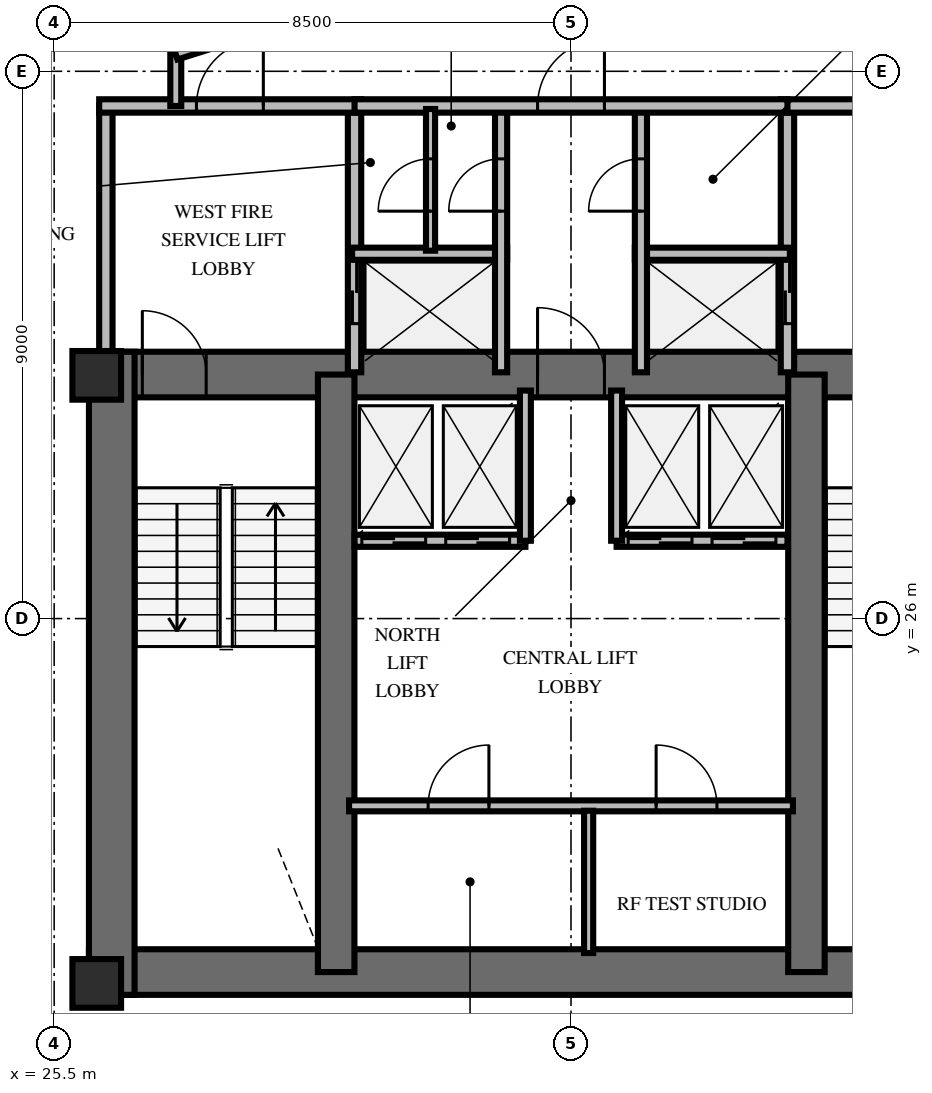
"""IFC4 building model, lengths in metres.
Left out: names, types, materials, properties, quantities, classifications, styles, units other than length and angle.
Written with IfcOpenShell. Run it as: python <this file> out.ifc"""

import sys

from ifc_helpers import new_model, si_unit, direction, frame, frame_2d, origin, origin_2d, place, context, subcontext, project, spatial, rectangle, extrude, element, fill, save


model = new_model("IFC4")
c1 = context("Model", 3, precision=1e-05, world=origin(), true_north=direction((0.0, 1.0)))
c2 = subcontext(c1, "Body", "Model", "MODEL_VIEW")
j1 = project(units=[si_unit("LENGTHUNIT", "METRE"), si_unit("PLANEANGLEUNIT", "RADIAN")], contexts=[c1])
p1 = place(None, origin())
s1 = spatial("IfcSite", under=j1, at=p1, CompositionType="ELEMENT")
p2 = place(p1, origin())
s2 = spatial("IfcBuilding", under=s1, at=p2, CompositionType="ELEMENT")
p3 = place(p2, frame((0.0, 0.0, 173.6)))
s3 = spatial("IfcBuildingStorey", under=s2, at=p3, CompositionType="ELEMENT", Elevation=173.6)
p4 = place(p3, frame((26.072, 20.187, 0.0), z_axis=(0.0, 0.0, 1.0), x_axis=(1.0, 0.0, 0.0)))
e1 = element("IfcWall", 1, at=p4, inside=s3, PredefinedType="SHEAR", context=c2, shape_type="SweptSolid", body=[
    extrude(rectangle(XDim=15.866, YDim=0.75, at=frame_2d((7.933, 0.0))), origin(), (0.0, 0.0, 1.0), 3.6),
])
p5 = place(p3, frame((26.072, 30.013, 0.0), z_axis=(0.0, 0.0, 1.0), x_axis=(1.0, 0.0, 0.0)))
e2 = element("IfcWall", 2, at=p5, inside=s3, PredefinedType="SHEAR", context=c2, shape_type="SweptSolid", body=[
    extrude(rectangle(XDim=15.866, YDim=0.75, at=frame_2d((7.933, 0.0))), origin(), (0.0, 0.0, 1.0), 3.6),
])
p6 = place(p5, frame((0.878, 0.0, 0.0)))
e3 = element("IfcOpeningElement", 3, at=p6, cuts=e2, PredefinedType="OPENING", context=c2, shape_type="SweptSolid", body=[
    extrude(rectangle(XDim=1.05, YDim=2.15, at=frame_2d((0.525, 1.075))), frame((0.0, 0.385, 0.0), z_axis=(0.0, -1.0, 0.0), x_axis=(1.0, 0.0, 0.0)), (0.0, 0.0, 1.0), 0.77),
])
p7 = place(p5, frame((13.928, 0.0, 0.0)))
e4 = element("IfcOpeningElement", 4, at=p7, cuts=e2, PredefinedType="OPENING", context=c2, shape_type="SweptSolid", body=[
    extrude(rectangle(XDim=1.05, YDim=2.15, at=frame_2d((0.525, 1.075))), frame((0.0, 0.385, 0.0), z_axis=(0.0, -1.0, 0.0), x_axis=(1.0, 0.0, 0.0)), (0.0, 0.0, 1.0), 0.77),
])
p8 = place(p5, frame((7.378, 0.0, 0.0)))
e5 = element("IfcOpeningElement", 5, at=p8, cuts=e2, PredefinedType="OPENING", context=c2, shape_type="SweptSolid", body=[
    extrude(rectangle(XDim=1.1, YDim=2.15, at=frame_2d((0.55, 1.075))), frame((0.0, 0.385, 0.0), z_axis=(0.0, -1.0, 0.0), x_axis=(1.0, 0.0, 0.0)), (0.0, 0.0, 1.0), 0.77),
])
p9 = place(p3, frame((26.447, 19.812, 0.0), z_axis=(0.0, 0.0, 1.0), x_axis=(0.0, 1.0, 0.0)))
e6 = element("IfcWall", 6, at=p9, inside=s3, PredefinedType="SHEAR", context=c2, shape_type="SweptSolid", body=[
    extrude(rectangle(XDim=10.576, YDim=0.75, at=frame_2d((5.288, 0.0))), origin(), (0.0, 0.0, 1.0), 3.6),
])
for number, where, z_axis, x_axis in (
    (7, (30.138, 20.187, 0.0), (0.0, 0.0, 1.0), (0.0, 1.0, 0.0)),
    (8, (37.872, 20.187, 0.0), (0.0, 0.0, 1.0), (0.0, 1.0, 0.0)),
):
    element("IfcWall", number, at=place(p3, frame(where, z_axis=z_axis, x_axis=x_axis)), inside=s3, PredefinedType="SHEAR", context=c2, shape_type="SweptSolid", body=[
        extrude(rectangle(XDim=9.826, YDim=0.6, at=frame_2d((4.913, 0.0))), origin(), (0.0, 0.0, 1.0), 3.6),
    ])
for number, where, z_axis, x_axis in (
    (9, (26.2, 20.0, 0.0), (0.0, 0.0, 1.0), (1.0, 0.0, 0.0)),
    (10, (26.2, 30.0, 0.0), (0.0, 0.0, 1.0), (1.0, 0.0, 0.0)),
):
    element("IfcColumn", number, at=place(p3, frame(where, z_axis=z_axis, x_axis=x_axis)), inside=s3, PredefinedType="PILASTER", context=c2, shape_type="SweptSolid", body=[
        extrude(rectangle(XDim=0.8, YDim=0.8, at=origin_2d()), origin(), (0.0, 0.0, 1.0), 3.6),
    ])
p10 = place(p3, frame((26.35, 30.05, 0.0), z_axis=(0.0, 0.0, 1.0), x_axis=(0.0, 1.0, 0.0)))
e11 = element("IfcWall", 11, at=p10, inside=s3, PredefinedType="SOLIDWALL", context=c2, shape_type="SweptSolid", body=[
    extrude(rectangle(XDim=4.38, YDim=0.22, at=frame_2d((2.19, 0.0))), origin(), (0.0, 0.0, 1.0), 2.46),
])
p11 = place(p3, frame((30.44, 30.05, 0.0), z_axis=(0.0, 0.0, 1.0), x_axis=(0.0, 1.0, 0.0)))
e12 = element("IfcWall", 12, at=p11, inside=s3, PredefinedType="SOLIDWALL", context=c2, shape_type="SweptSolid", body=[
    extrude(rectangle(XDim=4.38, YDim=0.22, at=frame_2d((2.19, 0.0))), origin(), (0.0, 0.0, 1.0), 2.46),
])
p12 = place(p11, frame((0.8, 0.0, 0.0)))
e13 = element("IfcOpeningElement", 13, at=p12, cuts=e12, PredefinedType="OPENING", context=c2, shape_type="SweptSolid", body=[
    extrude(rectangle(XDim=1.05, YDim=2.1, at=frame_2d((0.525, 1.05))), frame((0.0, 0.12, 0.0), z_axis=(0.0, -1.0, 0.0), x_axis=(1.0, 0.0, 0.0)), (0.0, 0.0, 1.0), 0.24),
])
p13 = place(p3, frame((26.24, 34.43, 0.0), z_axis=(0.0, 0.0, 1.0), x_axis=(1.0, 0.0, 0.0)))
e14 = element("IfcWall", 14, at=p13, inside=s3, PredefinedType="SOLIDWALL", context=c2, shape_type="SweptSolid", body=[
    extrude(rectangle(XDim=4.31, YDim=0.22, at=frame_2d((2.155, 0.0))), origin(), (0.0, 0.0, 1.0), 2.46),
])
p14 = place(p13, frame((1.6, 0.0, 0.0)))
e15 = element("IfcOpeningElement", 15, at=p14, cuts=e14, PredefinedType="OPENING", context=c2, shape_type="SweptSolid", body=[
    extrude(rectangle(XDim=1.1, YDim=2.15, at=frame_2d((0.55, 1.075))), frame((0.0, 0.12, 0.0), z_axis=(0.0, -1.0, 0.0), x_axis=(1.0, 0.0, 0.0)), (0.0, 0.0, 1.0), 0.24),
])
p15 = place(p3, frame((30.4, 32.0, 0.0), z_axis=(0.0, 0.0, 1.0), x_axis=(1.0, 0.0, 0.0)))
e16 = element("IfcWall", 16, at=p15, inside=s3, PredefinedType="SOLIDWALL", context=c2, shape_type="SweptSolid", body=[
    extrude(rectangle(XDim=2.55, YDim=0.2, at=frame_2d((1.275, 0.0))), origin(), (0.0, 0.0, 1.0), 2.46),
])
p16 = place(p3, frame((32.85, 30.05, 0.0), z_axis=(0.0, 0.0, 1.0), x_axis=(0.0, 1.0, 0.0)))
e17 = element("IfcWall", 17, at=p16, inside=s3, PredefinedType="SOLIDWALL", context=c2, shape_type="SweptSolid", body=[
    extrude(rectangle(XDim=4.38, YDim=0.2, at=frame_2d((2.19, 0.0))), origin(), (0.0, 0.0, 1.0), 2.46),
])
p17 = place(p16, frame((2.65, 0.0, 0.0)))
e18 = element("IfcOpeningElement", 18, at=p17, cuts=e17, PredefinedType="OPENING", context=c2, shape_type="SweptSolid", body=[
    extrude(rectangle(XDim=0.86, YDim=2.05, at=frame_2d((0.43, 1.025))), frame((0.0, 0.11, 0.0), z_axis=(0.0, -1.0, 0.0), x_axis=(1.0, 0.0, 0.0)), (0.0, 0.0, 1.0), 0.22),
])
p18 = place(p3, frame((37.56, 30.05, 0.0), z_axis=(0.0, 0.0, 1.0), x_axis=(0.0, 1.0, 0.0)))
e19 = element("IfcWall", 19, at=p18, inside=s3, PredefinedType="SOLIDWALL", context=c2, shape_type="SweptSolid", body=[
    extrude(rectangle(XDim=4.38, YDim=0.22, at=frame_2d((2.19, 0.0))), origin(), (0.0, 0.0, 1.0), 2.46),
])
p19 = place(p18, frame((0.8, 0.0, 0.0)))
e20 = element("IfcOpeningElement", 20, at=p19, cuts=e19, PredefinedType="OPENING", context=c2, shape_type="SweptSolid", body=[
    extrude(rectangle(XDim=1.05, YDim=2.1, at=frame_2d((0.525, 1.05))), frame((0.0, 0.12, 0.0), z_axis=(0.0, -1.0, 0.0), x_axis=(1.0, 0.0, 0.0)), (0.0, 0.0, 1.0), 0.24),
])
p20 = place(p3, frame((37.45, 34.43, 0.0), z_axis=(0.0, 0.0, 1.0), x_axis=(1.0, 0.0, 0.0)))
e21 = element("IfcWall", 21, at=p20, inside=s3, PredefinedType="SOLIDWALL", context=c2, shape_type="SweptSolid", body=[
    extrude(rectangle(XDim=4.31, YDim=0.22, at=frame_2d((2.155, 0.0))), origin(), (0.0, 0.0, 1.0), 2.46),
])
p21 = place(p20, frame((1.6, 0.0, 0.0)))
e22 = element("IfcOpeningElement", 22, at=p21, cuts=e21, PredefinedType="OPENING", context=c2, shape_type="SweptSolid", body=[
    extrude(rectangle(XDim=1.1, YDim=2.15, at=frame_2d((0.55, 1.075))), frame((0.0, 0.12, 0.0), z_axis=(0.0, -1.0, 0.0), x_axis=(1.0, 0.0, 0.0)), (0.0, 0.0, 1.0), 0.24),
])
p22 = place(p3, frame((35.05, 32.0, 0.0), z_axis=(0.0, 0.0, 1.0), x_axis=(1.0, 0.0, 0.0)))
e23 = element("IfcWall", 23, at=p22, inside=s3, PredefinedType="SOLIDWALL", context=c2, shape_type="SweptSolid", body=[
    extrude(rectangle(XDim=2.55, YDim=0.2, at=frame_2d((1.275, 0.0))), origin(), (0.0, 0.0, 1.0), 2.46),
])
p23 = place(p3, frame((35.15, 30.05, 0.0), z_axis=(0.0, 0.0, 1.0), x_axis=(0.0, 1.0, 0.0)))
e24 = element("IfcWall", 24, at=p23, inside=s3, PredefinedType="SOLIDWALL", context=c2, shape_type="SweptSolid", body=[
    extrude(rectangle(XDim=4.38, YDim=0.2, at=frame_2d((2.19, 0.0))), origin(), (0.0, 0.0, 1.0), 2.46),
])
p24 = place(p23, frame((2.65, 0.0, 0.0)))
e25 = element("IfcOpeningElement", 25, at=p24, cuts=e24, PredefinedType="OPENING", context=c2, shape_type="SweptSolid", body=[
    extrude(rectangle(XDim=0.86, YDim=2.05, at=frame_2d((0.43, 1.025))), frame((0.0, 0.11, 0.0), z_axis=(0.0, -1.0, 0.0), x_axis=(1.0, 0.0, 0.0)), (0.0, 0.0, 1.0), 0.22),
])
p25 = place(p3, frame((30.44, 34.43, 0.0), z_axis=(0.0, 0.0, 1.0), x_axis=(1.0, 0.0, 0.0)))
e26 = element("IfcWall", 26, at=p25, inside=s3, PredefinedType="SOLIDWALL", context=c2, shape_type="SweptSolid", body=[
    extrude(rectangle(XDim=7.12, YDim=0.22, at=frame_2d((3.56, 0.0))), origin(), (0.0, 0.0, 1.0), 2.46),
])
p26 = place(p25, frame((3.01, 0.0, 0.0)))
e27 = element("IfcOpeningElement", 27, at=p26, cuts=e26, PredefinedType="OPENING", context=c2, shape_type="SweptSolid", body=[
    extrude(rectangle(XDim=1.1, YDim=2.15, at=frame_2d((0.55, 1.075))), frame((0.0, 0.12, 0.0), z_axis=(0.0, -1.0, 0.0), x_axis=(1.0, 0.0, 0.0)), (0.0, 0.0, 1.0), 0.24),
])
p27 = place(p3, frame((31.69, 32.05, 0.0), z_axis=(0.0, 0.0, 1.0), x_axis=(0.0, 1.0, 0.0)))
e28 = element("IfcWall", 28, at=p27, inside=s3, PredefinedType="PARTITIONING", context=c2, shape_type="SweptSolid", body=[
    extrude(rectangle(XDim=2.33, YDim=0.15, at=frame_2d((1.165, 0.0))), origin(), (0.0, 0.0, 1.0), 2.46),
])
p28 = place(p27, frame((0.65, 0.0, 0.0)))
e29 = element("IfcOpeningElement", 29, at=p28, cuts=e28, PredefinedType="OPENING", context=c2, shape_type="SweptSolid", body=[
    extrude(rectangle(XDim=0.86, YDim=2.05, at=frame_2d((0.43, 1.025))), frame((0.0, 0.085, 0.0), z_axis=(0.0, -1.0, 0.0), x_axis=(1.0, 0.0, 0.0)), (0.0, 0.0, 1.0), 0.17),
])
p29 = place(p3, frame((30.35, 22.92, 0.0), z_axis=(0.0, 0.0, 1.0), x_axis=(1.0, 0.0, 0.0)))
e30 = element("IfcWall", 30, at=p29, inside=s3, PredefinedType="PARTITIONING", context=c2, shape_type="SweptSolid", body=[
    extrude(rectangle(XDim=7.3, YDim=0.18, at=frame_2d((3.65, 0.0))), origin(), (0.0, 0.0, 1.0), 2.46),
])
p30 = place(p29, frame((1.3, 0.0, 0.0)))
e31 = element("IfcOpeningElement", 31, at=p30, cuts=e30, PredefinedType="OPENING", context=c2, shape_type="SweptSolid", body=[
    extrude(rectangle(XDim=1.0, YDim=2.15, at=frame_2d((0.5, 1.075))), frame((0.0, 0.1, 0.0), z_axis=(0.0, -1.0, 0.0), x_axis=(1.0, 0.0, 0.0)), (0.0, 0.0, 1.0), 0.2),
])
p31 = place(p29, frame((5.05, 0.0, 0.0)))
e32 = element("IfcOpeningElement", 32, at=p31, cuts=e30, PredefinedType="OPENING", context=c2, shape_type="SweptSolid", body=[
    extrude(rectangle(XDim=1.0, YDim=2.15, at=frame_2d((0.5, 1.075))), frame((0.0, 0.1, 0.0), z_axis=(0.0, -1.0, 0.0), x_axis=(1.0, 0.0, 0.0)), (0.0, 0.0, 1.0), 0.2),
])
p32 = place(p3, frame((34.29, 20.5, 0.0), z_axis=(0.0, 0.0, 1.0), x_axis=(0.0, 1.0, 0.0)))
e33 = element("IfcWall", 33, at=p32, inside=s3, PredefinedType="PARTITIONING", context=c2, shape_type="SweptSolid", body=[
    extrude(rectangle(XDim=2.34, YDim=0.15, at=frame_2d((1.17, 0.0))), origin(), (0.0, 0.0, 1.0), 2.46),
])
p33 = place(p3, frame((30.44, 27.28, 0.0), z_axis=(0.0, 0.0, 1.0), x_axis=(1.0, 0.0, 0.0)))
e34 = element("IfcWall", 34, at=p33, inside=s3, PredefinedType="SOLIDWALL", context=c2, shape_type="SweptSolid", body=[
    extrude(rectangle(XDim=2.81, YDim=0.2, at=frame_2d((1.405, 0.0))), origin(), (0.0, 0.0, 1.0), 2.46),
])
p34 = place(p33, frame((0.12, 0.0, 0.0)))
e35 = element("IfcOpeningElement", 35, at=p34, cuts=e34, PredefinedType="OPENING", context=c2, shape_type="SweptSolid", body=[
    extrude(rectangle(XDim=1.05, YDim=2.1, at=frame_2d((0.525, 1.05))), frame((0.0, 0.11, 0.0), z_axis=(0.0, -1.0, 0.0), x_axis=(1.0, 0.0, 0.0)), (0.0, 0.0, 1.0), 0.22),
])
p35 = place(p33, frame((1.5, 0.0, 0.0)))
e36 = element("IfcOpeningElement", 36, at=p35, cuts=e34, PredefinedType="OPENING", context=c2, shape_type="SweptSolid", body=[
    extrude(rectangle(XDim=1.05, YDim=2.1, at=frame_2d((0.525, 1.05))), frame((0.0, 0.11, 0.0), z_axis=(0.0, -1.0, 0.0), x_axis=(1.0, 0.0, 0.0)), (0.0, 0.0, 1.0), 0.22),
])
p36 = place(p3, frame((33.25, 27.28, 0.0), z_axis=(0.0, 0.0, 1.0), x_axis=(0.0, 1.0, 0.0)))
e37 = element("IfcWall", 37, at=p36, inside=s3, PredefinedType="SOLIDWALL", context=c2, shape_type="SweptSolid", body=[
    extrude(rectangle(XDim=2.47, YDim=0.18, at=frame_2d((1.235, 0.0))), origin(), (0.0, 0.0, 1.0), 2.46),
])
p37 = place(p3, frame((34.75, 27.28, 0.0), z_axis=(0.0, 0.0, 1.0), x_axis=(1.0, 0.0, 0.0)))
e38 = element("IfcWall", 38, at=p37, inside=s3, PredefinedType="SOLIDWALL", context=c2, shape_type="SweptSolid", body=[
    extrude(rectangle(XDim=2.81, YDim=0.2, at=frame_2d((1.405, 0.0))), origin(), (0.0, 0.0, 1.0), 2.46),
])
p38 = place(p37, frame((0.19, 0.0, 0.0)))
e39 = element("IfcOpeningElement", 39, at=p38, cuts=e38, PredefinedType="OPENING", context=c2, shape_type="SweptSolid", body=[
    extrude(rectangle(XDim=1.05, YDim=2.1, at=frame_2d((0.525, 1.05))), frame((0.0, 0.11, 0.0), z_axis=(0.0, -1.0, 0.0), x_axis=(1.0, 0.0, 0.0)), (0.0, 0.0, 1.0), 0.22),
])
p39 = place(p37, frame((1.57, 0.0, 0.0)))
e40 = element("IfcOpeningElement", 40, at=p39, cuts=e38, PredefinedType="OPENING", context=c2, shape_type="SweptSolid", body=[
    extrude(rectangle(XDim=1.05, YDim=2.1, at=frame_2d((0.525, 1.05))), frame((0.0, 0.11, 0.0), z_axis=(0.0, -1.0, 0.0), x_axis=(1.0, 0.0, 0.0)), (0.0, 0.0, 1.0), 0.22),
])
p40 = place(p3, frame((34.75, 27.28, 0.0), z_axis=(0.0, 0.0, 1.0), x_axis=(0.0, 1.0, 0.0)))
e41 = element("IfcWall", 41, at=p40, inside=s3, PredefinedType="SOLIDWALL", context=c2, shape_type="SweptSolid", body=[
    extrude(rectangle(XDim=2.47, YDim=0.18, at=frame_2d((1.235, 0.0))), origin(), (0.0, 0.0, 1.0), 2.46),
])
p41 = place(p3, frame((27.5, 34.43, 0.0), z_axis=(0.0, 0.0, 1.0), x_axis=(0.0, 1.0, 0.0)))
e42 = element("IfcWall", 42, at=p41, inside=s3, PredefinedType="PARTITIONING", context=c2, shape_type="SweptSolid", body=[
    extrude(rectangle(XDim=0.85, YDim=0.18, at=frame_2d((0.425, 0.0))), origin(), (0.0, 0.0, 1.0), 2.46),
])
p42 = place(p3, frame((27.5, 35.28, 0.0), z_axis=(0.0, 0.0, 1.0), x_axis=(0.953691418528, 0.300786765376, 0.0)))
e43 = element("IfcWall", 43, at=p42, inside=s3, PredefinedType="PARTITIONING", context=c2, shape_type="SweptSolid", body=[
    extrude(rectangle(XDim=6.816, YDim=0.18, at=frame_2d((3.408, 0.0))), origin(), (0.0, 0.0, 1.0), 2.46),
])
p43 = place(p42, frame((2.858, 0.0, 0.0)))
e44 = element("IfcOpeningElement", 44, at=p43, cuts=e43, PredefinedType="OPENING", context=c2, shape_type="SweptSolid", body=[
    extrude(rectangle(XDim=1.1, YDim=2.15, at=frame_2d((0.55, 1.075))), frame((0.0, 0.1, 0.0), z_axis=(0.0, -1.0, 0.0), x_axis=(1.0, 0.0, 0.0)), (0.0, 0.0, 1.0), 0.2),
])
p44 = place(p3, frame((34.0, 37.33, 0.0), z_axis=(0.0, 0.0, 1.0), x_axis=(0.953691418528, -0.300786765376, 0.0)))
e45 = element("IfcWall", 45, at=p44, inside=s3, PredefinedType="PARTITIONING", context=c2, shape_type="SweptSolid", body=[
    extrude(rectangle(XDim=6.816, YDim=0.18, at=frame_2d((3.408, 0.0))), origin(), (0.0, 0.0, 1.0), 2.46),
])
p45 = place(p44, frame((2.858, 0.0, 0.0)))
e46 = element("IfcOpeningElement", 46, at=p45, cuts=e45, PredefinedType="OPENING", context=c2, shape_type="SweptSolid", body=[
    extrude(rectangle(XDim=1.1, YDim=2.15, at=frame_2d((0.55, 1.075))), frame((0.0, 0.1, 0.0), z_axis=(0.0, -1.0, 0.0), x_axis=(1.0, 0.0, 0.0)), (0.0, 0.0, 1.0), 0.2),
])
p46 = place(p6, origin())
e47 = element("IfcDoor", 47, at=p46, inside=s3, OperationType="SINGLE_SWING_LEFT", PredefinedType="DOOR", context=c2, shape_type="SweptSolid", body=[
    extrude(rectangle(XDim=1.05, YDim=2.15, at=frame_2d((0.525, 1.075))), frame((0.0, 0.025, 0.0), z_axis=(0.0, -1.0, 0.0), x_axis=(1.0, 0.0, 0.0)), (0.0, 0.0, 1.0), 0.05),
])
fill(e3, e47)
p47 = place(p8, origin())
e48 = element("IfcDoor", 48, at=p47, inside=s3, OperationType="SINGLE_SWING_LEFT", PredefinedType="DOOR", context=c2, shape_type="SweptSolid", body=[
    extrude(rectangle(XDim=1.1, YDim=2.15, at=frame_2d((0.55, 1.075))), frame((0.0, 0.025, 0.0), z_axis=(0.0, -1.0, 0.0), x_axis=(1.0, 0.0, 0.0)), (0.0, 0.0, 1.0), 0.05),
])
fill(e5, e48)
p48 = place(p14, origin())
e49 = element("IfcDoor", 49, at=p48, inside=s3, OperationType="SINGLE_SWING_RIGHT", PredefinedType="DOOR", context=c2, shape_type="SweptSolid", body=[
    extrude(rectangle(XDim=1.1, YDim=2.15, at=frame_2d((0.55, 1.075))), frame((0.0, 0.025, 0.0), z_axis=(0.0, -1.0, 0.0), x_axis=(1.0, 0.0, 0.0)), (0.0, 0.0, 1.0), 0.05),
])
fill(e15, e49)
p49 = place(p12, origin())
e50 = element("IfcDoor", 50, at=p49, inside=s3, OperationType="DOUBLE_DOOR_SLIDING", PredefinedType="USERDEFINED", context=c2, shape_type="SweptSolid", body=[
    extrude(rectangle(XDim=1.05, YDim=2.1, at=frame_2d((0.525, 1.05))), frame((0.0, 0.025, 0.0), z_axis=(0.0, -1.0, 0.0), x_axis=(1.0, 0.0, 0.0)), (0.0, 0.0, 1.0), 0.05),
])
fill(e13, e50)
p50 = place(p17, origin())
e51 = element("IfcDoor", 51, at=p50, inside=s3, OperationType="SINGLE_SWING_LEFT", PredefinedType="TRAPDOOR", context=c2, shape_type="SweptSolid", body=[
    extrude(rectangle(XDim=0.86, YDim=2.05, at=frame_2d((0.43, 1.025))), frame((0.0, 0.025, 0.0), z_axis=(0.0, -1.0, 0.0), x_axis=(1.0, 0.0, 0.0)), (0.0, 0.0, 1.0), 0.05),
])
fill(e18, e51)
p51 = place(p19, origin())
e52 = element("IfcDoor", 52, at=p51, inside=s3, OperationType="DOUBLE_DOOR_SLIDING", PredefinedType="USERDEFINED", context=c2, shape_type="SweptSolid", body=[
    extrude(rectangle(XDim=1.05, YDim=2.1, at=frame_2d((0.525, 1.05))), frame((0.0, 0.025, 0.0), z_axis=(0.0, -1.0, 0.0), x_axis=(1.0, 0.0, 0.0)), (0.0, 0.0, 1.0), 0.05),
])
fill(e20, e52)
p52 = place(p24, origin())
e53 = element("IfcDoor", 53, at=p52, inside=s3, OperationType="SINGLE_SWING_LEFT", PredefinedType="TRAPDOOR", context=c2, shape_type="SweptSolid", body=[
    extrude(rectangle(XDim=0.86, YDim=2.05, at=frame_2d((0.43, 1.025))), frame((0.0, 0.025, 0.0), z_axis=(0.0, -1.0, 0.0), x_axis=(1.0, 0.0, 0.0)), (0.0, 0.0, 1.0), 0.05),
])
fill(e25, e53)
p53 = place(p26, origin())
e54 = element("IfcDoor", 54, at=p53, inside=s3, OperationType="SINGLE_SWING_RIGHT", PredefinedType="DOOR", context=c2, shape_type="SweptSolid", body=[
    extrude(rectangle(XDim=1.1, YDim=2.15, at=frame_2d((0.55, 1.075))), frame((0.0, 0.025, 0.0), z_axis=(0.0, -1.0, 0.0), x_axis=(1.0, 0.0, 0.0)), (0.0, 0.0, 1.0), 0.05),
])
fill(e27, e54)
p54 = place(p28, origin())
e55 = element("IfcDoor", 55, at=p54, inside=s3, OperationType="SINGLE_SWING_LEFT", PredefinedType="TRAPDOOR", context=c2, shape_type="SweptSolid", body=[
    extrude(rectangle(XDim=0.86, YDim=2.05, at=frame_2d((0.43, 1.025))), frame((0.0, 0.025, 0.0), z_axis=(0.0, -1.0, 0.0), x_axis=(1.0, 0.0, 0.0)), (0.0, 0.0, 1.0), 0.05),
])
fill(e29, e55)
p55 = place(p30, origin())
e56 = element("IfcDoor", 56, at=p55, inside=s3, OperationType="SINGLE_SWING_RIGHT", PredefinedType="DOOR", context=c2, shape_type="SweptSolid", body=[
    extrude(rectangle(XDim=1.0, YDim=2.15, at=frame_2d((0.5, 1.075))), frame((0.0, 0.025, 0.0), z_axis=(0.0, -1.0, 0.0), x_axis=(1.0, 0.0, 0.0)), (0.0, 0.0, 1.0), 0.05),
])
fill(e31, e56)
p56 = place(p31, origin())
e57 = element("IfcDoor", 57, at=p56, inside=s3, OperationType="SINGLE_SWING_LEFT", PredefinedType="DOOR", context=c2, shape_type="SweptSolid", body=[
    extrude(rectangle(XDim=1.0, YDim=2.15, at=frame_2d((0.5, 1.075))), frame((0.0, 0.025, 0.0), z_axis=(0.0, -1.0, 0.0), x_axis=(1.0, 0.0, 0.0)), (0.0, 0.0, 1.0), 0.05),
])
fill(e32, e57)
p57 = place(p34, origin())
e58 = element("IfcDoor", 58, at=p57, inside=s3, OperationType="DOUBLE_DOOR_SLIDING", PredefinedType="USERDEFINED", context=c2, shape_type="SweptSolid", body=[
    extrude(rectangle(XDim=1.05, YDim=2.1, at=frame_2d((0.525, 1.05))), frame((0.0, 0.025, 0.0), z_axis=(0.0, -1.0, 0.0), x_axis=(1.0, 0.0, 0.0)), (0.0, 0.0, 1.0), 0.05),
])
fill(e35, e58)
p58 = place(p35, origin())
e59 = element("IfcDoor", 59, at=p58, inside=s3, OperationType="DOUBLE_DOOR_SLIDING", PredefinedType="USERDEFINED", context=c2, shape_type="SweptSolid", body=[
    extrude(rectangle(XDim=1.05, YDim=2.1, at=frame_2d((0.525, 1.05))), frame((0.0, 0.025, 0.0), z_axis=(0.0, -1.0, 0.0), x_axis=(1.0, 0.0, 0.0)), (0.0, 0.0, 1.0), 0.05),
])
fill(e36, e59)
p59 = place(p38, origin())
e60 = element("IfcDoor", 60, at=p59, inside=s3, OperationType="DOUBLE_DOOR_SLIDING", PredefinedType="USERDEFINED", context=c2, shape_type="SweptSolid", body=[
    extrude(rectangle(XDim=1.05, YDim=2.1, at=frame_2d((0.525, 1.05))), frame((0.0, 0.025, 0.0), z_axis=(0.0, -1.0, 0.0), x_axis=(1.0, 0.0, 0.0)), (0.0, 0.0, 1.0), 0.05),
])
fill(e39, e60)
p60 = place(p39, origin())
e61 = element("IfcDoor", 61, at=p60, inside=s3, OperationType="DOUBLE_DOOR_SLIDING", PredefinedType="USERDEFINED", context=c2, shape_type="SweptSolid", body=[
    extrude(rectangle(XDim=1.05, YDim=2.1, at=frame_2d((0.525, 1.05))), frame((0.0, 0.025, 0.0), z_axis=(0.0, -1.0, 0.0), x_axis=(1.0, 0.0, 0.0)), (0.0, 0.0, 1.0), 0.05),
])
fill(e40, e61)
save(model, sys.argv[1])
